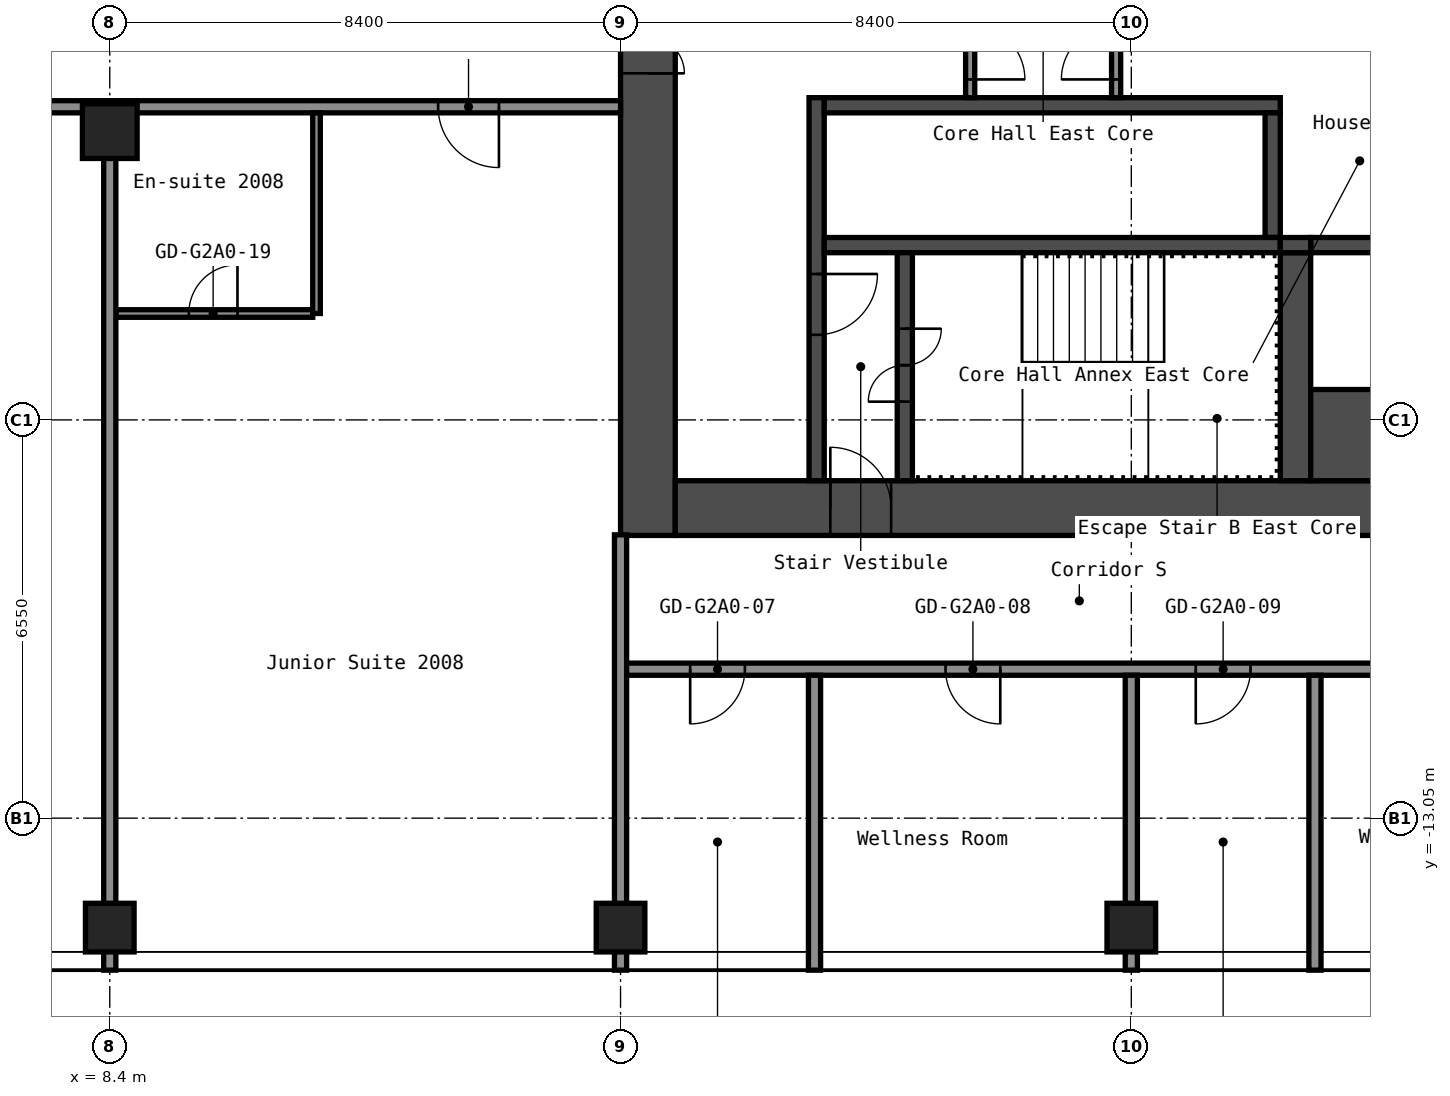
"""IFC4 building model, lengths in metres.
Left out: names, types, materials, properties, quantities, classifications, styles, units other than length and angle.
Written with IfcOpenShell. Run it as: python <this file> out.ifc"""

import sys

from ifc_helpers import new_model, si_unit, direction, frame, frame_2d, origin, origin_2d, place, context, subcontext, project, spatial, rectangle, hollow_rectangle, extrude, element, fill, save


model = new_model("IFC4")
c1 = context("Model", 3, precision=1e-05, world=origin(), true_north=direction((0.0, 1.0)))
c2 = subcontext(c1, "Body", "Model", "MODEL_VIEW")
j1 = project(units=[si_unit("LENGTHUNIT", "METRE"), si_unit("PLANEANGLEUNIT", "RADIAN")], contexts=[c1])
p1 = place(None, origin())
s1 = spatial("IfcSite", under=j1, at=p1, CompositionType="ELEMENT")
p2 = place(p1, origin())
s2 = spatial("IfcBuilding", under=s1, at=p2, CompositionType="ELEMENT")
p3 = place(p2, frame((0.0, 0.0, 75.4)))
s3 = spatial("IfcBuildingStorey", under=s2, at=p3, CompositionType="ELEMENT", Elevation=75.4)
p4 = place(p3, frame((8.4, -14.85, 0.0), z_axis=(0.0, 0.0, 1.0), x_axis=(1.0, 0.0, 0.0)))
e1 = element("IfcColumn", 1, at=p4, inside=s3, PredefinedType="COLUMN", context=c2, shape_type="SweptSolid", body=[
    extrude(hollow_rectangle(XDim=0.8, YDim=0.8, WallThickness=0.032, at=origin_2d()), origin(), (0.0, 0.0, 1.0), 2.8),
])
p5 = place(p3, frame((8.4, -1.75, 0.0), z_axis=(0.0, 0.0, 1.0), x_axis=(1.0, 0.0, 0.0)))
e2 = element("IfcColumn", 2, at=p5, inside=s3, PredefinedType="COLUMN", context=c2, shape_type="SweptSolid", body=[
    extrude(hollow_rectangle(XDim=0.9, YDim=0.9, WallThickness=0.036, at=origin_2d()), origin(), (0.0, 0.0, 1.0), 2.8),
])
for number, where, z_axis, x_axis in (
    (3, (16.8, -14.85, 0.0), (0.0, 0.0, 1.0), (1.0, 0.0, 0.0)),
    (4, (25.2, -14.85, 0.0), (0.0, 0.0, 1.0), (1.0, 0.0, 0.0)),
):
    element("IfcColumn", number, at=place(p3, frame(where, z_axis=z_axis, x_axis=x_axis)), inside=s3, PredefinedType="COLUMN", context=c2, shape_type="SweptSolid", body=[
        extrude(hollow_rectangle(XDim=0.8, YDim=0.8, WallThickness=0.032, at=origin_2d()), origin(), (0.0, 0.0, 1.0), 2.8),
    ])
p6 = place(p3, frame((17.25, -8.4, 0.0), z_axis=(0.0, 0.0, 1.0), x_axis=(0.0, 1.0, 0.0)))
e5 = element("IfcWall", 5, at=p6, inside=s3, PredefinedType="SHEAR", context=c2, shape_type="SweptSolid", body=[
    extrude(rectangle(XDim=16.8, YDim=0.9, at=frame_2d((8.4, 0.0))), origin(), (0.0, 0.0, 1.0), 2.8),
])
p7 = place(p6, frame((7.6, 0.0, 0.0)))
e6 = element("IfcOpeningElement", 6, at=p7, cuts=e5, PredefinedType="OPENING", context=c2, shape_type="SweptSolid", body=[
    extrude(rectangle(XDim=1.2, YDim=2.1, at=frame_2d((0.6, 1.05))), frame((0.0, 0.46, 0.0), z_axis=(0.0, -1.0, 0.0), x_axis=(1.0, 0.0, 0.0)), (0.0, 0.0, 1.0), 0.92),
])
p8 = place(p3, frame((17.7, -7.95, 0.0), z_axis=(0.0, 0.0, 1.0), x_axis=(1.0, 0.0, 0.0)))
e7 = element("IfcWall", 7, at=p8, inside=s3, PredefinedType="SHEAR", context=c2, shape_type="SweptSolid", body=[
    extrude(rectangle(XDim=15.0, YDim=0.9, at=frame_2d((7.5, 0.0))), origin(), (0.0, 0.0, 1.0), 2.8),
])
p9 = place(p8, frame((2.55, 0.0, 0.0)))
e8 = element("IfcOpeningElement", 8, at=p9, cuts=e7, PredefinedType="OPENING", context=c2, shape_type="SweptSolid", body=[
    extrude(rectangle(XDim=1.0, YDim=2.1, at=frame_2d((0.5, 1.05))), frame((0.0, 0.46, 0.0), z_axis=(0.0, -1.0, 0.0), x_axis=(1.0, 0.0, 0.0)), (0.0, 0.0, 1.0), 0.92),
])
p10 = place(p3, frame((20.025, -7.5, 0.0), z_axis=(0.0, 0.0, 1.0), x_axis=(0.0, 1.0, 0.0)))
e9 = element("IfcWall", 9, at=p10, inside=s3, PredefinedType="SHEAR", context=c2, shape_type="SweptSolid", body=[
    extrude(rectangle(XDim=6.3, YDim=0.25, at=frame_2d((3.15, 0.0))), origin(), (0.0, 0.0, 1.0), 2.8),
])
p11 = place(p10, frame((2.4, 0.0, 0.0)))
e10 = element("IfcOpeningElement", 10, at=p11, cuts=e9, PredefinedType="OPENING", context=c2, shape_type="SweptSolid", body=[
    extrude(rectangle(XDim=1.0, YDim=2.1, at=frame_2d((0.5, 1.05))), frame((0.0, 0.135, 0.0), z_axis=(0.0, -1.0, 0.0), x_axis=(1.0, 0.0, 0.0)), (0.0, 0.0, 1.0), 0.27),
])
p12 = place(p3, frame((20.15, -1.325, 0.0), z_axis=(0.0, 0.0, 1.0), x_axis=(1.0, 0.0, 0.0)))
e11 = element("IfcWall", 11, at=p12, inside=s3, PredefinedType="SHEAR", context=c2, shape_type="SweptSolid", body=[
    extrude(rectangle(XDim=7.5, YDim=0.25, at=frame_2d((3.75, 0.0))), origin(), (0.0, 0.0, 1.0), 2.8),
])
p13 = place(p3, frame((27.525, -3.5, 0.0), z_axis=(0.0, 0.0, 1.0), x_axis=(0.0, 1.0, 0.0)))
e12 = element("IfcWall", 12, at=p13, inside=s3, PredefinedType="SHEAR", context=c2, shape_type="SweptSolid", body=[
    extrude(rectangle(XDim=2.05, YDim=0.25, at=frame_2d((1.025, 0.0))), origin(), (0.0, 0.0, 1.0), 2.8),
])
p14 = place(p3, frame((20.15, -3.625, 0.0), z_axis=(0.0, 0.0, 1.0), x_axis=(1.0, 0.0, 0.0)))
e13 = element("IfcWall", 13, at=p14, inside=s3, PredefinedType="SHEAR", context=c2, shape_type="SweptSolid", body=[
    extrude(rectangle(XDim=7.5, YDim=0.25, at=frame_2d((3.75, 0.0))), origin(), (0.0, 0.0, 1.0), 2.8),
])
p15 = place(p3, frame((21.475, -7.5, 0.0), z_axis=(0.0, 0.0, 1.0), x_axis=(0.0, 1.0, 0.0)))
e14 = element("IfcWall", 14, at=p15, inside=s3, PredefinedType="SHEAR", context=c2, shape_type="SweptSolid", body=[
    extrude(rectangle(XDim=3.75, YDim=0.25, at=frame_2d((1.875, 0.0))), origin(), (0.0, 0.0, 1.0), 2.8),
])
p16 = place(p15, frame((1.3, 0.0, 0.0)))
e15 = element("IfcOpeningElement", 15, at=p16, cuts=e14, PredefinedType="OPENING", context=c2, shape_type="SweptSolid", body=[
    extrude(rectangle(XDim=1.2, YDim=2.1, at=frame_2d((0.6, 1.05))), frame((0.0, 0.135, 0.0), z_axis=(0.0, -1.0, 0.0), x_axis=(1.0, 0.0, 0.0)), (0.0, 0.0, 1.0), 0.27),
])
p17 = place(p3, frame((27.9, -7.5, 0.0), z_axis=(0.0, 0.0, 1.0), x_axis=(0.0, 1.0, 0.0)))
e16 = element("IfcWall", 16, at=p17, inside=s3, PredefinedType="SHEAR", context=c2, shape_type="SweptSolid", body=[
    extrude(rectangle(XDim=3.75, YDim=0.5, at=frame_2d((1.875, 0.0))), origin(), (0.0, 0.0, 1.0), 2.8),
])
p18 = place(p3, frame((28.15, -3.625, 0.0), z_axis=(0.0, 0.0, 1.0), x_axis=(1.0, 0.0, 0.0)))
e17 = element("IfcWall", 17, at=p18, inside=s3, PredefinedType="SHEAR", context=c2, shape_type="SweptSolid", body=[
    extrude(rectangle(XDim=4.55, YDim=0.25, at=frame_2d((2.275, 0.0))), origin(), (0.0, 0.0, 1.0), 2.8),
])
p19 = place(p3, frame((28.15, -6.75, 0.0), z_axis=(0.0, 0.0, 1.0), x_axis=(1.0, 0.0, 0.0)))
e18 = element("IfcWall", 18, at=p19, inside=s3, PredefinedType="SHEAR", context=c2, shape_type="SweptSolid", body=[
    extrude(rectangle(XDim=4.55, YDim=1.5, at=frame_2d((2.275, 0.0))), origin(), (0.0, 0.0, 1.0), 2.8),
])
p20 = place(p3, frame((27.65, -3.625, 0.0), z_axis=(0.0, 0.0, 1.0), x_axis=(1.0, 0.0, 0.0)))
e19 = element("IfcWall", 19, at=p20, inside=s3, PredefinedType="SHEAR", context=c2, shape_type="SweptSolid", body=[
    extrude(rectangle(XDim=0.5, YDim=0.25, at=frame_2d((0.25, 0.0))), origin(), (0.0, 0.0, 1.0), 2.8),
])
p21 = place(p3, frame((22.55, -1.2, 0.0), z_axis=(0.0, 0.0, 1.0), x_axis=(0.0, 1.0, 0.0)))
e20 = element("IfcWall", 20, at=p21, inside=s3, PredefinedType="PARTITIONING", context=c2, shape_type="SweptSolid", body=[
    extrude(rectangle(XDim=2.4, YDim=0.15, at=frame_2d((1.2, 0.0))), origin(), (0.0, 0.0, 1.0), 2.8),
])
p22 = place(p21, frame((0.3, 0.0, 0.0)))
e21 = element("IfcOpeningElement", 21, at=p22, cuts=e20, PredefinedType="OPENING", context=c2, shape_type="SweptSolid", body=[
    extrude(rectangle(XDim=1.8, YDim=2.1, at=frame_2d((0.9, 1.05))), frame((0.0, 0.085, 0.0), z_axis=(0.0, -1.0, 0.0), x_axis=(1.0, 0.0, 0.0)), (0.0, 0.0, 1.0), 0.17),
])
p23 = place(p3, frame((24.95, -1.2, 0.0), z_axis=(0.0, 0.0, 1.0), x_axis=(0.0, 1.0, 0.0)))
e22 = element("IfcWall", 22, at=p23, inside=s3, PredefinedType="PARTITIONING", context=c2, shape_type="SweptSolid", body=[
    extrude(rectangle(XDim=2.4, YDim=0.15, at=frame_2d((1.2, 0.0))), origin(), (0.0, 0.0, 1.0), 2.8),
])
p24 = place(p23, frame((0.3, 0.0, 0.0)))
e23 = element("IfcOpeningElement", 23, at=p24, cuts=e22, PredefinedType="OPENING", context=c2, shape_type="SweptSolid", body=[
    extrude(rectangle(XDim=1.8, YDim=2.1, at=frame_2d((0.9, 1.05))), frame((0.0, 0.085, 0.0), z_axis=(0.0, -1.0, 0.0), x_axis=(1.0, 0.0, 0.0)), (0.0, 0.0, 1.0), 0.17),
])
p25 = place(p3, frame((16.8, -10.6, 0.0), z_axis=(0.0, 0.0, 1.0), x_axis=(1.0, 0.0, 0.0)))
e24 = element("IfcWall", 24, at=p25, inside=s3, PredefinedType="PARTITIONING", context=c2, shape_type="SweptSolid", body=[
    extrude(rectangle(XDim=29.7, YDim=0.2, at=frame_2d((14.85, 0.0))), origin(), (0.0, 0.0, 1.0), 2.8),
])
p26 = place(p25, frame((1.145, 0.0, 0.0)))
e25 = element("IfcOpeningElement", 25, at=p26, cuts=e24, PredefinedType="OPENING", context=c2, shape_type="SweptSolid", body=[
    extrude(rectangle(XDim=0.9, YDim=2.1, at=frame_2d((0.45, 1.05))), frame((0.0, 0.11, 0.0), z_axis=(0.0, -1.0, 0.0), x_axis=(1.0, 0.0, 0.0)), (0.0, 0.0, 1.0), 0.22),
])
p27 = place(p25, frame((5.345, 0.0, 0.0)))
e26 = element("IfcOpeningElement", 26, at=p27, cuts=e24, PredefinedType="OPENING", context=c2, shape_type="SweptSolid", body=[
    extrude(rectangle(XDim=0.9, YDim=2.1, at=frame_2d((0.45, 1.05))), frame((0.0, 0.11, 0.0), z_axis=(0.0, -1.0, 0.0), x_axis=(1.0, 0.0, 0.0)), (0.0, 0.0, 1.0), 0.22),
])
p28 = place(p25, frame((9.46, 0.0, 0.0)))
e27 = element("IfcOpeningElement", 27, at=p28, cuts=e24, PredefinedType="OPENING", context=c2, shape_type="SweptSolid", body=[
    extrude(rectangle(XDim=0.9, YDim=2.1, at=frame_2d((0.45, 1.05))), frame((0.0, 0.11, 0.0), z_axis=(0.0, -1.0, 0.0), x_axis=(1.0, 0.0, 0.0)), (0.0, 0.0, 1.0), 0.22),
])
p29 = place(p25, frame((13.66, 0.0, 0.0)))
e28 = element("IfcOpeningElement", 28, at=p29, cuts=e24, PredefinedType="OPENING", context=c2, shape_type="SweptSolid", body=[
    extrude(rectangle(XDim=0.9, YDim=2.1, at=frame_2d((0.45, 1.05))), frame((0.0, 0.11, 0.0), z_axis=(0.0, -1.0, 0.0), x_axis=(1.0, 0.0, 0.0)), (0.0, 0.0, 1.0), 0.22),
])
p30 = place(p25, frame((19.04, 0.0, 0.0)))
e29 = element("IfcOpeningElement", 29, at=p30, cuts=e24, PredefinedType="OPENING", context=c2, shape_type="SweptSolid", body=[
    extrude(rectangle(XDim=0.9, YDim=2.1, at=frame_2d((0.45, 1.05))), frame((0.0, 0.11, 0.0), z_axis=(0.0, -1.0, 0.0), x_axis=(1.0, 0.0, 0.0)), (0.0, 0.0, 1.0), 0.22),
])
p31 = place(p25, frame((23.24, 0.0, 0.0)))
e30 = element("IfcOpeningElement", 30, at=p31, cuts=e24, PredefinedType="OPENING", context=c2, shape_type="SweptSolid", body=[
    extrude(rectangle(XDim=0.9, YDim=2.1, at=frame_2d((0.45, 1.05))), frame((0.0, 0.11, 0.0), z_axis=(0.0, -1.0, 0.0), x_axis=(1.0, 0.0, 0.0)), (0.0, 0.0, 1.0), 0.22),
])
p32 = place(p25, frame((26.85, 0.0, 0.0)))
e31 = element("IfcOpeningElement", 31, at=p32, cuts=e24, PredefinedType="OPENING", context=c2, shape_type="SweptSolid", body=[
    extrude(rectangle(XDim=0.9, YDim=2.1, at=frame_2d((0.45, 1.05))), frame((0.0, 0.11, 0.0), z_axis=(0.0, -1.0, 0.0), x_axis=(1.0, 0.0, 0.0)), (0.0, 0.0, 1.0), 0.22),
])
p33 = place(p3, frame((8.5, -4.75, 0.0), z_axis=(0.0, 0.0, 1.0), x_axis=(1.0, 0.0, 0.0)))
e32 = element("IfcWall", 32, at=p33, inside=s3, PredefinedType="PARTITIONING", context=c2, shape_type="SweptSolid", body=[
    extrude(rectangle(XDim=3.238, YDim=0.125, at=frame_2d((1.619, 0.0))), origin(), (0.0, 0.0, 1.0), 2.8),
])
p34 = place(p33, frame((1.2, 0.0, 0.0)))
e33 = element("IfcOpeningElement", 33, at=p34, cuts=e32, PredefinedType="OPENING", context=c2, shape_type="SweptSolid", body=[
    extrude(rectangle(XDim=0.8, YDim=2.1, at=frame_2d((0.4, 1.05))), frame((0.0, 0.073, 0.0), z_axis=(0.0, -1.0, 0.0), x_axis=(1.0, 0.0, 0.0)), (0.0, 0.0, 1.0), 0.145),
])
p35 = place(p3, frame((-16.8, -1.35, 0.0), z_axis=(0.0, 0.0, 1.0), x_axis=(1.0, 0.0, 0.0)))
e34 = element("IfcWall", 34, at=p35, inside=s3, PredefinedType="PARTITIONING", context=c2, shape_type="SweptSolid", body=[
    extrude(rectangle(XDim=33.6, YDim=0.2, at=frame_2d((16.8, 0.0))), origin(), (0.0, 0.0, 1.0), 2.8),
])
p36 = place(p35, frame((1.9, 0.0, 0.0)))
e35 = element("IfcOpeningElement", 35, at=p36, cuts=e34, PredefinedType="OPENING", context=c2, shape_type="SweptSolid", body=[
    extrude(rectangle(XDim=1.0, YDim=2.1, at=frame_2d((0.5, 1.05))), frame((0.0, 0.11, 0.0), z_axis=(0.0, -1.0, 0.0), x_axis=(1.0, 0.0, 0.0)), (0.0, 0.0, 1.0), 0.22),
])
p37 = place(p35, frame((9.63, 0.0, 0.0)))
e36 = element("IfcOpeningElement", 36, at=p37, cuts=e34, PredefinedType="OPENING", context=c2, shape_type="SweptSolid", body=[
    extrude(rectangle(XDim=0.9, YDim=2.1, at=frame_2d((0.45, 1.05))), frame((0.0, 0.11, 0.0), z_axis=(0.0, -1.0, 0.0), x_axis=(1.0, 0.0, 0.0)), (0.0, 0.0, 1.0), 0.22),
])
p38 = place(p35, frame((13.83, 0.0, 0.0)))
e37 = element("IfcOpeningElement", 37, at=p38, cuts=e34, PredefinedType="OPENING", context=c2, shape_type="SweptSolid", body=[
    extrude(rectangle(XDim=0.9, YDim=2.1, at=frame_2d((0.45, 1.05))), frame((0.0, 0.11, 0.0), z_axis=(0.0, -1.0, 0.0), x_axis=(1.0, 0.0, 0.0)), (0.0, 0.0, 1.0), 0.22),
])
p39 = place(p35, frame((22.2, 0.0, 0.0)))
e38 = element("IfcOpeningElement", 38, at=p39, cuts=e34, PredefinedType="OPENING", context=c2, shape_type="SweptSolid", body=[
    extrude(rectangle(XDim=1.0, YDim=2.1, at=frame_2d((0.5, 1.05))), frame((0.0, 0.11, 0.0), z_axis=(0.0, -1.0, 0.0), x_axis=(1.0, 0.0, 0.0)), (0.0, 0.0, 1.0), 0.22),
])
p40 = place(p35, frame((30.6, 0.0, 0.0)))
e39 = element("IfcOpeningElement", 39, at=p40, cuts=e34, PredefinedType="OPENING", context=c2, shape_type="SweptSolid", body=[
    extrude(rectangle(XDim=1.0, YDim=2.1, at=frame_2d((0.5, 1.05))), frame((0.0, 0.11, 0.0), z_axis=(0.0, -1.0, 0.0), x_axis=(1.0, 0.0, 0.0)), (0.0, 0.0, 1.0), 0.22),
])
p41 = place(p3, frame((8.4, -15.55, 0.0), z_axis=(0.0, 0.0, 1.0), x_axis=(0.0, 1.0, 0.0)))
e40 = element("IfcWall", 40, at=p41, inside=s3, PredefinedType="PARTITIONING", context=c2, shape_type="SweptSolid", body=[
    extrude(rectangle(XDim=13.36, YDim=0.2, at=frame_2d((6.68, 0.0))), origin(), (0.0, 0.0, 1.0), 2.8),
])
p42 = place(p3, frame((11.8, -4.75, 0.0), z_axis=(0.0, 0.0, 1.0), x_axis=(0.0, 1.0, 0.0)))
e41 = element("IfcWall", 41, at=p42, inside=s3, PredefinedType="PARTITIONING", context=c2, shape_type="SweptSolid", body=[
    extrude(rectangle(XDim=3.3, YDim=0.125, at=frame_2d((1.65, 0.0))), origin(), (0.0, 0.0, 1.0), 2.8),
])
p43 = place(p3, frame((16.8, -15.55, 0.0), z_axis=(0.0, 0.0, 1.0), x_axis=(0.0, 1.0, 0.0)))
e42 = element("IfcWall", 42, at=p43, inside=s3, PredefinedType="PARTITIONING", context=c2, shape_type="SweptSolid", body=[
    extrude(rectangle(XDim=7.16, YDim=0.2, at=frame_2d((3.58, 0.0))), origin(), (0.0, 0.0, 1.0), 2.8),
])
for number, where, z_axis, x_axis in (
    (43, (19.99, -15.55, 0.0), (0.0, 0.0, 1.0), (0.0, 1.0, 0.0)),
    (44, (25.2, -15.55, 0.0), (0.0, 0.0, 1.0), (0.0, 1.0, 0.0)),
    (45, (28.22, -15.55, 0.0), (0.0, 0.0, 1.0), (0.0, 1.0, 0.0)),
):
    element("IfcWall", number, at=place(p3, frame(where, z_axis=z_axis, x_axis=x_axis)), inside=s3, PredefinedType="PARTITIONING", context=c2, shape_type="SweptSolid", body=[
        extrude(rectangle(XDim=4.85, YDim=0.2, at=frame_2d((2.425, 0.0))), origin(), (0.0, 0.0, 1.0), 2.8),
    ])
p44 = place(p7, origin())
e46 = element("IfcDoor", 46, at=p44, inside=s3, OperationType="DOUBLE_DOOR_SINGLE_SWING", PredefinedType="DOOR", context=c2, shape_type="SweptSolid", body=[
    extrude(rectangle(XDim=1.2, YDim=2.1, at=frame_2d((0.6, 1.05))), frame((0.0, 0.025, 0.0), z_axis=(0.0, -1.0, 0.0), x_axis=(1.0, 0.0, 0.0)), (0.0, 0.0, 1.0), 0.05),
])
fill(e6, e46)
p45 = place(p9, origin())
e47 = element("IfcDoor", 47, at=p45, inside=s3, OperationType="SINGLE_SWING_RIGHT", PredefinedType="DOOR", context=c2, shape_type="SweptSolid", body=[
    extrude(rectangle(XDim=1.0, YDim=2.1, at=frame_2d((0.5, 1.05))), frame((0.0, 0.025, 0.0), z_axis=(0.0, -1.0, 0.0), x_axis=(1.0, 0.0, 0.0)), (0.0, 0.0, 1.0), 0.05),
])
fill(e8, e47)
p46 = place(p16, origin())
e48 = element("IfcDoor", 48, at=p46, inside=s3, OperationType="DOUBLE_DOOR_SINGLE_SWING", PredefinedType="DOOR", context=c2, shape_type="SweptSolid", body=[
    extrude(rectangle(XDim=1.2, YDim=2.1, at=frame_2d((0.6, 1.05))), frame((0.0, 0.025, 0.0), z_axis=(0.0, -1.0, 0.0), x_axis=(1.0, 0.0, 0.0)), (0.0, 0.0, 1.0), 0.05),
])
fill(e15, e48)
p47 = place(p11, origin())
e49 = element("IfcDoor", 49, at=p47, inside=s3, OperationType="SINGLE_SWING_RIGHT", PredefinedType="DOOR", context=c2, shape_type="SweptSolid", body=[
    extrude(rectangle(XDim=1.0, YDim=2.1, at=frame_2d((0.5, 1.05))), frame((0.0, 0.025, 0.0), z_axis=(0.0, -1.0, 0.0), x_axis=(1.0, 0.0, 0.0)), (0.0, 0.0, 1.0), 0.05),
])
fill(e10, e49)
p48 = place(p22, origin())
e50 = element("IfcDoor", 50, at=p48, inside=s3, OperationType="DOUBLE_DOOR_SINGLE_SWING", PredefinedType="DOOR", context=c2, shape_type="SweptSolid", body=[
    extrude(rectangle(XDim=1.8, YDim=2.1, at=frame_2d((0.9, 1.05))), frame((0.0, 0.025, 0.0), z_axis=(0.0, -1.0, 0.0), x_axis=(1.0, 0.0, 0.0)), (0.0, 0.0, 1.0), 0.05),
])
fill(e21, e50)
p49 = place(p24, origin())
e51 = element("IfcDoor", 51, at=p49, inside=s3, OperationType="DOUBLE_DOOR_SINGLE_SWING", PredefinedType="DOOR", context=c2, shape_type="SweptSolid", body=[
    extrude(rectangle(XDim=1.8, YDim=2.1, at=frame_2d((0.9, 1.05))), frame((0.0, 0.025, 0.0), z_axis=(0.0, -1.0, 0.0), x_axis=(1.0, 0.0, 0.0)), (0.0, 0.0, 1.0), 0.05),
])
fill(e23, e51)
p50 = place(p26, origin())
e52 = element("IfcDoor", 52, at=p50, inside=s3, OperationType="SINGLE_SWING_LEFT", PredefinedType="DOOR", context=c2, shape_type="SweptSolid", body=[
    extrude(rectangle(XDim=0.9, YDim=2.1, at=frame_2d((0.45, 1.05))), frame((0.0, 0.025, 0.0), z_axis=(0.0, -1.0, 0.0), x_axis=(1.0, 0.0, 0.0)), (0.0, 0.0, 1.0), 0.05),
])
fill(e25, e52)
p51 = place(p27, origin())
e53 = element("IfcDoor", 53, at=p51, inside=s3, OperationType="SINGLE_SWING_RIGHT", PredefinedType="DOOR", context=c2, shape_type="SweptSolid", body=[
    extrude(rectangle(XDim=0.9, YDim=2.1, at=frame_2d((0.45, 1.05))), frame((0.0, 0.025, 0.0), z_axis=(0.0, -1.0, 0.0), x_axis=(1.0, 0.0, 0.0)), (0.0, 0.0, 1.0), 0.05),
])
fill(e26, e53)
p52 = place(p28, origin())
e54 = element("IfcDoor", 54, at=p52, inside=s3, OperationType="SINGLE_SWING_LEFT", PredefinedType="DOOR", context=c2, shape_type="SweptSolid", body=[
    extrude(rectangle(XDim=0.9, YDim=2.1, at=frame_2d((0.45, 1.05))), frame((0.0, 0.025, 0.0), z_axis=(0.0, -1.0, 0.0), x_axis=(1.0, 0.0, 0.0)), (0.0, 0.0, 1.0), 0.05),
])
fill(e27, e54)
p53 = place(p34, origin())
e55 = element("IfcDoor", 55, at=p53, inside=s3, OperationType="SINGLE_SWING_LEFT", PredefinedType="DOOR", context=c2, shape_type="SweptSolid", body=[
    extrude(rectangle(XDim=0.8, YDim=2.1, at=frame_2d((0.4, 1.05))), frame((0.0, 0.025, 0.0), z_axis=(0.0, -1.0, 0.0), x_axis=(1.0, 0.0, 0.0)), (0.0, 0.0, 1.0), 0.05),
])
fill(e33, e55)
p54 = place(p40, origin())
e56 = element("IfcDoor", 56, at=p54, inside=s3, OperationType="SINGLE_SWING_RIGHT", PredefinedType="DOOR", context=c2, shape_type="SweptSolid", body=[
    extrude(rectangle(XDim=1.0, YDim=2.1, at=frame_2d((0.5, 1.05))), frame((0.0, 0.025, 0.0), z_axis=(0.0, -1.0, 0.0), x_axis=(1.0, 0.0, 0.0)), (0.0, 0.0, 1.0), 0.05),
])
fill(e39, e56)
save(model, sys.argv[1])
